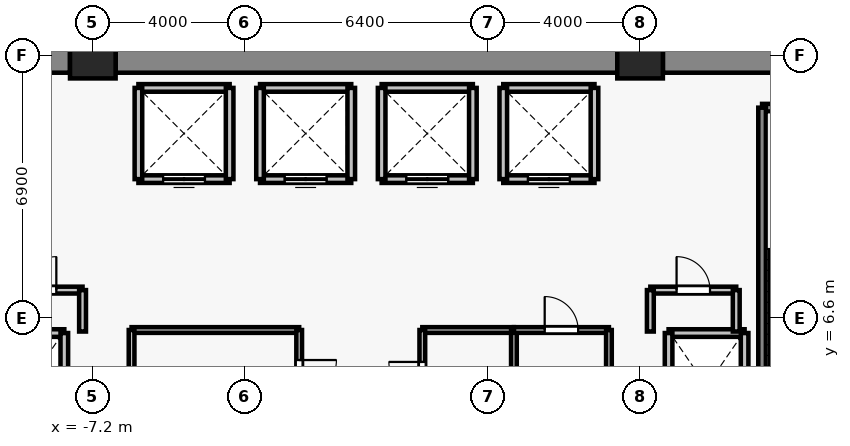
"""IFC4 building model, lengths in metres.
Left out: names, types, materials, properties, quantities, classifications, styles, units other than length and angle.
Written with IfcOpenShell. Run it as: python <this file> out.ifc"""

import sys

from ifc_helpers import new_model, si_unit, direction, frame, frame_2d, origin, origin_2d, place, context, subcontext, project, spatial, rectangle, extrude, source, transform, mapped, element, fill, save


model = new_model("IFC4")
c1 = context("Model", 3, precision=1e-05, world=origin(), true_north=direction((0.0, 1.0)))
c2 = subcontext(c1, "Body", "Model", "MODEL_VIEW")
j1 = project(units=[si_unit("LENGTHUNIT", "METRE"), si_unit("PLANEANGLEUNIT", "RADIAN")], contexts=[c1])
p1 = place(None, origin())
s1 = spatial("IfcSite", under=j1, at=p1, CompositionType="ELEMENT")
p2 = place(p1, origin())
s2 = spatial("IfcBuilding", under=s1, at=p2, CompositionType="ELEMENT")
p3 = place(p2, frame((0.0, 0.0, -8.8)))
s3 = spatial("IfcBuildingStorey", under=s2, at=p3, CompositionType="ELEMENT", Elevation=-8.8)
for number, where, z_axis, x_axis in (
    (1, (-7.2, 13.5, 0.0), (0.0, 0.0, 1.0), (1.0, 0.0, 0.0)),
    (2, (7.2, 13.5, 0.0), (0.0, 0.0, 1.0), (1.0, 0.0, 0.0)),
):
    element("IfcColumn", number, at=place(p3, frame(where, z_axis=z_axis, x_axis=x_axis)), inside=s3, PredefinedType="COLUMN", context=c2, shape_type="SweptSolid", body=[
        extrude(rectangle(XDim=1.2, YDim=1.2, at=origin_2d()), origin(), (0.0, 0.0, 1.0), 4.4),
    ])
p4 = place(p3, frame((-13.8, 13.5, 0.0), z_axis=(0.0, 0.0, 1.0), x_axis=(1.0, 0.0, 0.0)))
e3 = element("IfcWall", 3, at=p4, inside=s3, PredefinedType="SHEAR", context=c2, shape_type="SweptSolid", body=[
    extrude(rectangle(XDim=6.0, YDim=0.9, at=frame_2d((3.0, 0.0))), origin(), (0.0, 0.0, 1.0), 4.12),
])
p5 = place(p3, frame((-6.6, 13.5, 0.0), z_axis=(0.0, 0.0, 1.0), x_axis=(1.0, 0.0, 0.0)))
e4 = element("IfcWall", 4, at=p5, inside=s3, PredefinedType="SHEAR", context=c2, shape_type="SweptSolid", body=[
    extrude(rectangle(XDim=13.2, YDim=0.9, at=frame_2d((6.6, 0.0))), origin(), (0.0, 0.0, 1.0), 4.12),
])
p6 = place(p3, frame((7.8, 13.5, 0.0), z_axis=(0.0, 0.0, 1.0), x_axis=(1.0, 0.0, 0.0)))
e5 = element("IfcWall", 5, at=p6, inside=s3, PredefinedType="SHEAR", context=c2, shape_type="SweptSolid", body=[
    extrude(rectangle(XDim=6.0, YDim=0.9, at=frame_2d((3.0, 0.0))), origin(), (0.0, 0.0, 1.0), 4.12),
])
p7 = place(p3, frame((-9.95, 6.2, 0.0), z_axis=(0.0, 0.0, 1.0), x_axis=(1.0, 0.0, 0.0)))
e6 = element("IfcWall", 6, at=p7, inside=s3, PredefinedType="SOLIDWALL", context=c2, shape_type="SweptSolid", body=[
    extrude(rectangle(XDim=2.0, YDim=0.2, at=frame_2d((1.0, 0.0))), origin(), (0.0, 0.0, 1.0), 4.12),
])
p8 = place(p3, frame((-7.95, 6.2, 0.0), z_axis=(0.0, 0.0, 1.0), x_axis=(0.0, -1.0, 0.0)))
e7 = element("IfcWall", 7, at=p8, inside=s3, PredefinedType="SOLIDWALL", context=c2, shape_type="SweptSolid", body=[
    extrude(rectangle(XDim=2.8, YDim=0.2, at=frame_2d((1.4, 0.0))), origin(), (0.0, 0.0, 1.0), 4.12),
])
p9 = place(p3, frame((7.95, 6.2, 0.0), z_axis=(0.0, 0.0, 1.0), x_axis=(1.0, 0.0, 0.0)))
e8 = element("IfcWall", 8, at=p9, inside=s3, PredefinedType="SOLIDWALL", context=c2, shape_type="SweptSolid", body=[
    extrude(rectangle(XDim=2.0, YDim=0.2, at=frame_2d((1.0, 0.0))), origin(), (0.0, 0.0, 1.0), 4.12),
])
for number, where, z_axis, x_axis in (
    (9, (7.95, 3.4, 0.0), (0.0, 0.0, 1.0), (0.0, 1.0, 0.0)),
    (10, (9.95, 6.2, 0.0), (0.0, 0.0, 1.0), (0.0, -1.0, 0.0)),
):
    element("IfcWall", number, at=place(p3, frame(where, z_axis=z_axis, x_axis=x_axis)), inside=s3, PredefinedType="SOLIDWALL", context=c2, shape_type="SweptSolid", body=[
        extrude(rectangle(XDim=2.8, YDim=0.2, at=frame_2d((1.4, 0.0))), origin(), (0.0, 0.0, 1.0), 4.12),
    ])
p10 = place(p3, frame((-3.6, 10.25, 0.0), z_axis=(0.0, 0.0, 1.0), x_axis=(-1.0, 0.0, 0.0)))
e11 = element("IfcWall", 11, at=p10, inside=s3, PredefinedType="SOLIDWALL", context=c2, shape_type="SweptSolid", body=[
    extrude(rectangle(XDim=2.4, YDim=0.2, at=frame_2d((1.2, 0.0))), origin(), (0.0, 0.0, 1.0), 4.12),
])
p11 = place(p10, frame((0.65, 0.0, 0.0)))
e12 = element("IfcOpeningElement", 12, at=p11, cuts=e11, PredefinedType="OPENING", context=c2, shape_type="SweptSolid", body=[
    extrude(rectangle(XDim=1.1, YDim=2.2, at=frame_2d((0.55, 1.1))), frame((0.0, 0.11, 0.0), z_axis=(0.0, -1.0, 0.0), x_axis=(1.0, 0.0, 0.0)), (0.0, 0.0, 1.0), 0.22),
])
for number, where, z_axis, x_axis in (
    (13, (-6.0, 12.65, 0.0), (0.0, 0.0, 1.0), (1.0, 0.0, 0.0)),
    (14, (-6.0, 10.25, 0.0), (0.0, 0.0, 1.0), (0.0, 1.0, 0.0)),
    (15, (-3.6, 12.65, 0.0), (0.0, 0.0, 1.0), (0.0, -1.0, 0.0)),
):
    element("IfcWall", number, at=place(p3, frame(where, z_axis=z_axis, x_axis=x_axis)), inside=s3, PredefinedType="SOLIDWALL", context=c2, shape_type="SweptSolid", body=[
        extrude(rectangle(XDim=2.4, YDim=0.2, at=frame_2d((1.2, 0.0))), origin(), (0.0, 0.0, 1.0), 4.12),
    ])
p12 = place(p3, frame((-0.4, 10.25, 0.0), z_axis=(0.0, 0.0, 1.0), x_axis=(-1.0, 0.0, 0.0)))
e16 = element("IfcWall", 16, at=p12, inside=s3, PredefinedType="SOLIDWALL", context=c2, shape_type="SweptSolid", body=[
    extrude(rectangle(XDim=2.4, YDim=0.2, at=frame_2d((1.2, 0.0))), origin(), (0.0, 0.0, 1.0), 4.12),
])
p13 = place(p12, frame((0.65, 0.0, 0.0)))
e17 = element("IfcOpeningElement", 17, at=p13, cuts=e16, PredefinedType="OPENING", context=c2, shape_type="SweptSolid", body=[
    extrude(rectangle(XDim=1.1, YDim=2.2, at=frame_2d((0.55, 1.1))), frame((0.0, 0.11, 0.0), z_axis=(0.0, -1.0, 0.0), x_axis=(1.0, 0.0, 0.0)), (0.0, 0.0, 1.0), 0.22),
])
p14 = place(p3, frame((-2.8, 12.65, 0.0), z_axis=(0.0, 0.0, 1.0), x_axis=(1.0, 0.0, 0.0)))
e18 = element("IfcWall", 18, at=p14, inside=s3, PredefinedType="SOLIDWALL", context=c2, shape_type="SweptSolid", body=[
    extrude(rectangle(XDim=2.4, YDim=0.2, at=frame_2d((1.2, 0.0))), origin(), (0.0, 0.0, 1.0), 4.12),
])
for number, where, z_axis, x_axis in (
    (19, (-2.8, 10.25, 0.0), (0.0, 0.0, 1.0), (0.0, 1.0, 0.0)),
    (20, (-0.4, 12.65, 0.0), (0.0, 0.0, 1.0), (0.0, -1.0, 0.0)),
):
    element("IfcWall", number, at=place(p3, frame(where, z_axis=z_axis, x_axis=x_axis)), inside=s3, PredefinedType="SOLIDWALL", context=c2, shape_type="SweptSolid", body=[
        extrude(rectangle(XDim=2.4, YDim=0.2, at=frame_2d((1.2, 0.0))), origin(), (0.0, 0.0, 1.0), 4.12),
    ])
p15 = place(p3, frame((2.8, 10.25, 0.0), z_axis=(0.0, 0.0, 1.0), x_axis=(-1.0, 0.0, 0.0)))
e21 = element("IfcWall", 21, at=p15, inside=s3, PredefinedType="SOLIDWALL", context=c2, shape_type="SweptSolid", body=[
    extrude(rectangle(XDim=2.4, YDim=0.2, at=frame_2d((1.2, 0.0))), origin(), (0.0, 0.0, 1.0), 4.12),
])
p16 = place(p15, frame((0.65, 0.0, 0.0)))
e22 = element("IfcOpeningElement", 22, at=p16, cuts=e21, PredefinedType="OPENING", context=c2, shape_type="SweptSolid", body=[
    extrude(rectangle(XDim=1.1, YDim=2.2, at=frame_2d((0.55, 1.1))), frame((0.0, 0.11, 0.0), z_axis=(0.0, -1.0, 0.0), x_axis=(1.0, 0.0, 0.0)), (0.0, 0.0, 1.0), 0.22),
])
p17 = place(p3, frame((0.4, 12.65, 0.0), z_axis=(0.0, 0.0, 1.0), x_axis=(1.0, 0.0, 0.0)))
e23 = element("IfcWall", 23, at=p17, inside=s3, PredefinedType="SOLIDWALL", context=c2, shape_type="SweptSolid", body=[
    extrude(rectangle(XDim=2.4, YDim=0.2, at=frame_2d((1.2, 0.0))), origin(), (0.0, 0.0, 1.0), 4.12),
])
for number, where, z_axis, x_axis in (
    (24, (0.4, 10.25, 0.0), (0.0, 0.0, 1.0), (0.0, 1.0, 0.0)),
    (25, (2.8, 12.65, 0.0), (0.0, 0.0, 1.0), (0.0, -1.0, 0.0)),
):
    element("IfcWall", number, at=place(p3, frame(where, z_axis=z_axis, x_axis=x_axis)), inside=s3, PredefinedType="SOLIDWALL", context=c2, shape_type="SweptSolid", body=[
        extrude(rectangle(XDim=2.4, YDim=0.2, at=frame_2d((1.2, 0.0))), origin(), (0.0, 0.0, 1.0), 4.12),
    ])
p18 = place(p3, frame((6.0, 10.25, 0.0), z_axis=(0.0, 0.0, 1.0), x_axis=(-1.0, 0.0, 0.0)))
e26 = element("IfcWall", 26, at=p18, inside=s3, PredefinedType="SOLIDWALL", context=c2, shape_type="SweptSolid", body=[
    extrude(rectangle(XDim=2.4, YDim=0.2, at=frame_2d((1.2, 0.0))), origin(), (0.0, 0.0, 1.0), 4.12),
])
p19 = place(p18, frame((0.65, 0.0, 0.0)))
e27 = element("IfcOpeningElement", 27, at=p19, cuts=e26, PredefinedType="OPENING", context=c2, shape_type="SweptSolid", body=[
    extrude(rectangle(XDim=1.1, YDim=2.2, at=frame_2d((0.55, 1.1))), frame((0.0, 0.11, 0.0), z_axis=(0.0, -1.0, 0.0), x_axis=(1.0, 0.0, 0.0)), (0.0, 0.0, 1.0), 0.22),
])
for number, where, z_axis, x_axis in (
    (28, (3.6, 12.65, 0.0), (0.0, 0.0, 1.0), (1.0, 0.0, 0.0)),
    (29, (3.6, 10.25, 0.0), (0.0, 0.0, 1.0), (0.0, 1.0, 0.0)),
    (30, (6.0, 12.65, 0.0), (0.0, 0.0, 1.0), (0.0, -1.0, 0.0)),
):
    element("IfcWall", number, at=place(p3, frame(where, z_axis=z_axis, x_axis=x_axis)), inside=s3, PredefinedType="SOLIDWALL", context=c2, shape_type="SweptSolid", body=[
        extrude(rectangle(XDim=2.4, YDim=0.2, at=frame_2d((1.2, 0.0))), origin(), (0.0, 0.0, 1.0), 4.12),
    ])
p20 = place(p3, frame((10.41, 12.13, 0.0), z_axis=(0.0, 0.0, 1.0), x_axis=(1.0, 0.0, 0.0)))
e31 = element("IfcWall", 31, at=p20, inside=s3, PredefinedType="SOLIDWALL", context=c2, shape_type="SweptSolid", body=[
    extrude(rectangle(XDim=3.52, YDim=0.2, at=frame_2d((1.76, 0.0))), origin(), (0.0, 0.0, 1.0), 4.12),
])
p21 = place(p3, frame((10.41, 3.29, 0.0), z_axis=(0.0, 0.0, 1.0), x_axis=(0.0, 1.0, 0.0)))
e32 = element("IfcWall", 32, at=p21, inside=s3, PredefinedType="SOLIDWALL", context=c2, shape_type="SweptSolid", body=[
    extrude(rectangle(XDim=8.84, YDim=0.2, at=frame_2d((4.42, 0.0))), origin(), (0.0, 0.0, 1.0), 4.12),
])
p22 = place(p3, frame((-9.73, 7.33, 0.0), z_axis=(0.0, 0.0, 1.0), x_axis=(1.0, 0.0, 0.0)))
e33 = element("IfcWall", 33, at=p22, inside=s3, PredefinedType="PARTITIONING", context=c2, shape_type="SweptSolid", body=[
    extrude(rectangle(XDim=2.26, YDim=0.18, at=frame_2d((1.13, 0.0))), origin(), (0.0, 0.0, 1.0), 3.41),
])
p23 = place(p22, frame((0.69, 0.0, 0.0)))
e34 = element("IfcOpeningElement", 34, at=p23, cuts=e33, PredefinedType="OPENING", context=c2, shape_type="SweptSolid", body=[
    extrude(rectangle(XDim=0.88, YDim=2.1, at=frame_2d((0.44, 1.05))), frame((0.0, 0.1, 0.0), z_axis=(0.0, -1.0, 0.0), x_axis=(1.0, 0.0, 0.0)), (0.0, 0.0, 1.0), 0.2),
])
p24 = place(p3, frame((-7.47, 7.33, 0.0), z_axis=(0.0, 0.0, 1.0), x_axis=(0.0, -1.0, 0.0)))
e35 = element("IfcWall", 35, at=p24, inside=s3, PredefinedType="PARTITIONING", context=c2, shape_type="SweptSolid", body=[
    extrude(rectangle(XDim=1.09, YDim=0.18, at=frame_2d((0.545, 0.0))), origin(), (0.0, 0.0, 1.0), 3.41),
])
p25 = place(p3, frame((7.47, 7.33, 0.0), z_axis=(0.0, 0.0, 1.0), x_axis=(1.0, 0.0, 0.0)))
e36 = element("IfcWall", 36, at=p25, inside=s3, PredefinedType="PARTITIONING", context=c2, shape_type="SweptSolid", body=[
    extrude(rectangle(XDim=2.26, YDim=0.18, at=frame_2d((1.13, 0.0))), origin(), (0.0, 0.0, 1.0), 3.41),
])
p26 = place(p25, frame((0.69, 0.0, 0.0)))
e37 = element("IfcOpeningElement", 37, at=p26, cuts=e36, PredefinedType="OPENING", context=c2, shape_type="SweptSolid", body=[
    extrude(rectangle(XDim=0.88, YDim=2.1, at=frame_2d((0.44, 1.05))), frame((0.0, 0.1, 0.0), z_axis=(0.0, -1.0, 0.0), x_axis=(1.0, 0.0, 0.0)), (0.0, 0.0, 1.0), 0.2),
])
p27 = place(p3, frame((7.47, 6.24, 0.0), z_axis=(0.0, 0.0, 1.0), x_axis=(0.0, 1.0, 0.0)))
e38 = element("IfcWall", 38, at=p27, inside=s3, PredefinedType="PARTITIONING", context=c2, shape_type="SweptSolid", body=[
    extrude(rectangle(XDim=1.09, YDim=0.18, at=frame_2d((0.545, 0.0))), origin(), (0.0, 0.0, 1.0), 3.41),
])
p28 = place(p3, frame((9.73, 7.33, 0.0), z_axis=(0.0, 0.0, 1.0), x_axis=(0.0, -1.0, 0.0)))
e39 = element("IfcWall", 39, at=p28, inside=s3, PredefinedType="PARTITIONING", context=c2, shape_type="SweptSolid", body=[
    extrude(rectangle(XDim=1.09, YDim=0.18, at=frame_2d((0.545, 0.0))), origin(), (0.0, 0.0, 1.0), 4.12),
])
p29 = place(p3, frame((-6.18, 6.28, 0.0), z_axis=(0.0, 0.0, 1.0), x_axis=(1.0, 0.0, 0.0)))
e40 = element("IfcWall", 40, at=p29, inside=s3, PredefinedType="PARTITIONING", context=c2, shape_type="SweptSolid", body=[
    extrude(rectangle(XDim=4.41, YDim=0.15, at=frame_2d((2.205, 0.0))), origin(), (0.0, 0.0, 1.0), 4.12),
])
p30 = place(p3, frame((-6.18, 3.76, 0.0), z_axis=(0.0, 0.0, 1.0), x_axis=(0.0, 1.0, 0.0)))
e41 = element("IfcWall", 41, at=p30, inside=s3, PredefinedType="PARTITIONING", context=c2, shape_type="SweptSolid", body=[
    extrude(rectangle(XDim=2.52, YDim=0.15, at=frame_2d((1.26, 0.0))), origin(), (0.0, 0.0, 1.0), 4.12),
])
p31 = place(p3, frame((-1.77, 6.28, 0.0), z_axis=(0.0, 0.0, 1.0), x_axis=(0.0, -1.0, 0.0)))
e42 = element("IfcWall", 42, at=p31, inside=s3, PredefinedType="PARTITIONING", context=c2, shape_type="SweptSolid", body=[
    extrude(rectangle(XDim=2.52, YDim=0.15, at=frame_2d((1.26, 0.0))), origin(), (0.0, 0.0, 1.0), 4.12),
])
p32 = place(p31, frame((0.79, 0.0, 0.0)))
e43 = element("IfcOpeningElement", 43, at=p32, cuts=e42, PredefinedType="OPENING", context=c2, shape_type="SweptSolid", body=[
    extrude(rectangle(XDim=0.98, YDim=2.15, at=frame_2d((0.49, 1.075))), frame((0.0, 0.085, 0.0), z_axis=(0.0, -1.0, 0.0), x_axis=(1.0, 0.0, 0.0)), (0.0, 0.0, 1.0), 0.17),
])
p33 = place(p3, frame((1.47, 6.28, 0.0), z_axis=(0.0, 0.0, 1.0), x_axis=(1.0, 0.0, 0.0)))
e44 = element("IfcWall", 44, at=p33, inside=s3, PredefinedType="PARTITIONING", context=c2, shape_type="SweptSolid", body=[
    extrude(rectangle(XDim=2.41, YDim=0.15, at=frame_2d((1.205, 0.0))), origin(), (0.0, 0.0, 1.0), 4.12),
])
p34 = place(p3, frame((1.47, 3.76, 0.0), z_axis=(0.0, 0.0, 1.0), x_axis=(0.0, 1.0, 0.0)))
e45 = element("IfcWall", 45, at=p34, inside=s3, PredefinedType="PARTITIONING", context=c2, shape_type="SweptSolid", body=[
    extrude(rectangle(XDim=2.52, YDim=0.15, at=frame_2d((1.26, 0.0))), origin(), (0.0, 0.0, 1.0), 4.12),
])
p35 = place(p34, frame((0.8, 0.0, 0.0)))
e46 = element("IfcOpeningElement", 46, at=p35, cuts=e45, PredefinedType="OPENING", context=c2, shape_type="SweptSolid", body=[
    extrude(rectangle(XDim=0.88, YDim=2.1, at=frame_2d((0.44, 1.05))), frame((0.0, 0.085, 0.0), z_axis=(0.0, -1.0, 0.0), x_axis=(1.0, 0.0, 0.0)), (0.0, 0.0, 1.0), 0.17),
])
p36 = place(p3, frame((3.88, 6.28, 0.0), z_axis=(0.0, 0.0, 1.0), x_axis=(0.0, -1.0, 0.0)))
e47 = element("IfcWall", 47, at=p36, inside=s3, PredefinedType="PARTITIONING", context=c2, shape_type="SweptSolid", body=[
    extrude(rectangle(XDim=2.52, YDim=0.15, at=frame_2d((1.26, 0.0))), origin(), (0.0, 0.0, 1.0), 4.12),
])
p37 = place(p3, frame((3.88, 6.28, 0.0), z_axis=(0.0, 0.0, 1.0), x_axis=(1.0, 0.0, 0.0)))
e48 = element("IfcWall", 48, at=p37, inside=s3, PredefinedType="PARTITIONING", context=c2, shape_type="SweptSolid", body=[
    extrude(rectangle(XDim=2.5, YDim=0.15, at=frame_2d((1.25, 0.0))), origin(), (0.0, 0.0, 1.0), 4.12),
])
p38 = place(p37, frame((0.81, 0.0, 0.0)))
e49 = element("IfcOpeningElement", 49, at=p38, cuts=e48, PredefinedType="OPENING", context=c2, shape_type="SweptSolid", body=[
    extrude(rectangle(XDim=0.88, YDim=2.15, at=frame_2d((0.44, 1.075))), frame((0.0, 0.085, 0.0), z_axis=(0.0, -1.0, 0.0), x_axis=(1.0, 0.0, 0.0)), (0.0, 0.0, 1.0), 0.17),
])
p39 = place(p3, frame((6.38, 6.28, 0.0), z_axis=(0.0, 0.0, 1.0), x_axis=(0.0, -1.0, 0.0)))
e50 = element("IfcWall", 50, at=p39, inside=s3, PredefinedType="PARTITIONING", context=c2, shape_type="SweptSolid", body=[
    extrude(rectangle(XDim=2.52, YDim=0.15, at=frame_2d((1.26, 0.0))), origin(), (0.0, 0.0, 1.0), 4.12),
])
m1 = source(origin(), c2, "Body", "SweptSolid", [
    extrude(rectangle(XDim=1.1, YDim=2.2, at=frame_2d((0.55, 1.1))), frame((0.0, 0.025, 0.0), z_axis=(0.0, -1.0, 0.0), x_axis=(1.0, 0.0, 0.0)), (0.0, 0.0, 1.0), 0.05),
])
p40 = place(p11, origin())
e51 = element("IfcDoor", 51, at=p40, inside=s3, OperationType="DOUBLE_DOOR_SLIDING", PredefinedType="DOOR", context=c2, shape_type="MappedRepresentation", body=[
    mapped(m1, transform((0.0, 0.0, 0.0), x_axis=(1.0, 0.0, 0.0), y_axis=(0.0, 1.0, 0.0), z_axis=(0.0, 0.0, 1.0), scale=1.0)),
])
fill(e12, e51)
p41 = place(p13, origin())
e52 = element("IfcDoor", 52, at=p41, inside=s3, OperationType="DOUBLE_DOOR_SLIDING", PredefinedType="DOOR", context=c2, shape_type="MappedRepresentation", body=[
    mapped(m1, transform((0.0, 0.0, 0.0), x_axis=(1.0, 0.0, 0.0), y_axis=(0.0, 1.0, 0.0), z_axis=(0.0, 0.0, 1.0), scale=1.0)),
])
fill(e17, e52)
p42 = place(p16, origin())
e53 = element("IfcDoor", 53, at=p42, inside=s3, OperationType="DOUBLE_DOOR_SLIDING", PredefinedType="DOOR", context=c2, shape_type="MappedRepresentation", body=[
    mapped(m1, transform((0.0, 0.0, 0.0), x_axis=(1.0, 0.0, 0.0), y_axis=(0.0, 1.0, 0.0), z_axis=(0.0, 0.0, 1.0), scale=1.0)),
])
fill(e22, e53)
p43 = place(p19, origin())
e54 = element("IfcDoor", 54, at=p43, inside=s3, OperationType="DOUBLE_DOOR_SLIDING", PredefinedType="DOOR", context=c2, shape_type="MappedRepresentation", body=[
    mapped(m1, transform((0.0, 0.0, 0.0), x_axis=(1.0, 0.0, 0.0), y_axis=(0.0, 1.0, 0.0), z_axis=(0.0, 0.0, 1.0), scale=1.0)),
])
fill(e27, e54)
m2 = source(origin(), c2, "Body", "SweptSolid", [
    extrude(rectangle(XDim=0.98, YDim=2.15, at=frame_2d((0.49, 1.075))), frame((0.0, 0.025, 0.0), z_axis=(0.0, -1.0, 0.0), x_axis=(1.0, 0.0, 0.0)), (0.0, 0.0, 1.0), 0.05),
])
p44 = place(p32, origin())
e55 = element("IfcDoor", 55, at=p44, inside=s3, OperationType="SINGLE_SWING_LEFT", PredefinedType="DOOR", context=c2, shape_type="MappedRepresentation", body=[
    mapped(m2, transform((0.0, 0.0, 0.0), x_axis=(1.0, 0.0, 0.0), y_axis=(0.0, 1.0, 0.0), z_axis=(0.0, 0.0, 1.0), scale=1.0)),
])
fill(e43, e55)
m3 = source(origin(), c2, "Body", "SweptSolid", [
    extrude(rectangle(XDim=0.88, YDim=2.1, at=frame_2d((0.44, 1.05))), frame((0.0, 0.025, 0.0), z_axis=(0.0, -1.0, 0.0), x_axis=(1.0, 0.0, 0.0)), (0.0, 0.0, 1.0), 0.05),
])
p45 = place(p35, origin())
e56 = element("IfcDoor", 56, at=p45, inside=s3, OperationType="SINGLE_SWING_RIGHT", PredefinedType="DOOR", context=c2, shape_type="MappedRepresentation", body=[
    mapped(m3, transform((0.0, 0.0, 0.0), x_axis=(1.0, 0.0, 0.0), y_axis=(0.0, 1.0, 0.0), z_axis=(0.0, 0.0, 1.0), scale=1.0)),
])
fill(e46, e56)
m4 = source(origin(), c2, "Body", "SweptSolid", [
    extrude(rectangle(XDim=0.88, YDim=2.15, at=frame_2d((0.44, 1.075))), frame((0.0, 0.025, 0.0), z_axis=(0.0, -1.0, 0.0), x_axis=(1.0, 0.0, 0.0)), (0.0, 0.0, 1.0), 0.05),
])
p46 = place(p38, origin())
e57 = element("IfcDoor", 57, at=p46, inside=s3, OperationType="SINGLE_SWING_LEFT", PredefinedType="DOOR", context=c2, shape_type="MappedRepresentation", body=[
    mapped(m4, transform((0.0, 0.0, 0.0), x_axis=(1.0, 0.0, 0.0), y_axis=(0.0, 1.0, 0.0), z_axis=(0.0, 0.0, 1.0), scale=1.0)),
])
fill(e49, e57)
p47 = place(p23, origin())
e58 = element("IfcDoor", 58, at=p47, inside=s3, OperationType="SINGLE_SWING_RIGHT", PredefinedType="DOOR", context=c2, shape_type="MappedRepresentation", body=[
    mapped(m3, transform((0.0, 0.0, 0.0), x_axis=(1.0, 0.0, 0.0), y_axis=(0.0, 1.0, 0.0), z_axis=(0.0, 0.0, 1.0), scale=1.0)),
])
fill(e34, e58)
p48 = place(p26, origin())
e59 = element("IfcDoor", 59, at=p48, inside=s3, OperationType="SINGLE_SWING_LEFT", PredefinedType="DOOR", context=c2, shape_type="MappedRepresentation", body=[
    mapped(m3, transform((0.0, 0.0, 0.0), x_axis=(1.0, 0.0, 0.0), y_axis=(0.0, 1.0, 0.0), z_axis=(0.0, 0.0, 1.0), scale=1.0)),
])
fill(e37, e59)
save(model, sys.argv[1])
